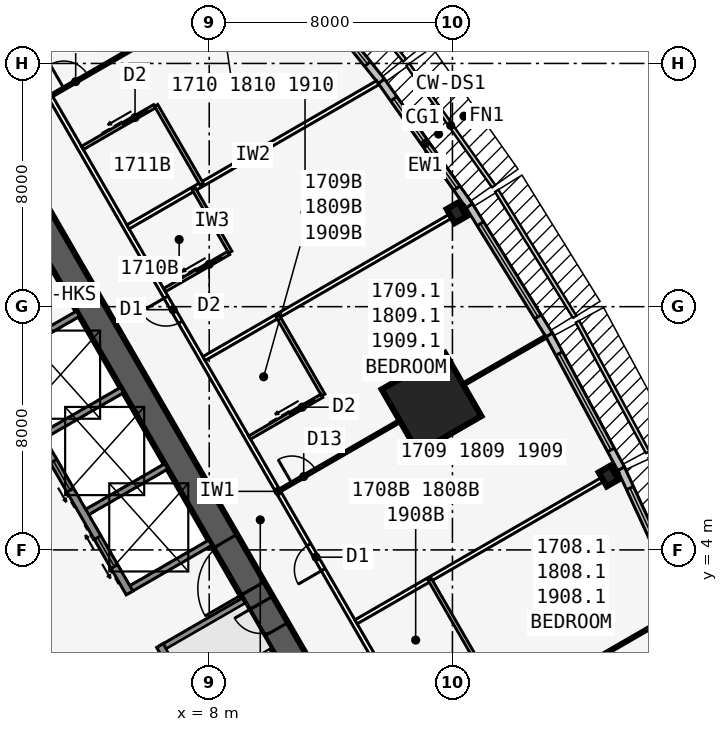
"""IFC4 building model, lengths in metres.
Left out: names, types, materials, properties, quantities, classifications, styles, units other than length and angle.
Written with IfcOpenShell. Run it as: python <this file> out.ifc"""

import sys

from ifc_helpers import new_model, si_unit, direction, frame, frame_2d, origin, origin_2d, place, context, subcontext, project, spatial, rectangle, i_section, extrude, element, fill, save


model = new_model("IFC4")
c1 = context("Model", 3, precision=1e-05, world=origin(), true_north=direction((0.0, 1.0)))
c2 = subcontext(c1, "Body", "Model", "MODEL_VIEW")
j1 = project(units=[si_unit("LENGTHUNIT", "METRE"), si_unit("PLANEANGLEUNIT", "RADIAN")], contexts=[c1])
p1 = place(None, origin())
s1 = spatial("IfcSite", under=j1, at=p1, CompositionType="ELEMENT")
p2 = place(p1, origin())
s2 = spatial("IfcBuilding", under=s1, at=p2, CompositionType="ELEMENT")
p3 = place(p2, frame((0.0, 0.0, 69.3)))
s3 = spatial("IfcBuildingStorey", under=s2, at=p3, CompositionType="ELEMENT", Elevation=69.3)
p4 = place(p3, frame((16.5, -9.526, 0.0), z_axis=(0.0, 0.0, 1.0), x_axis=(-0.499999749417, 0.866025548458, 0.0)))
e1 = element("IfcWall", 1, at=p4, inside=s3, PredefinedType="SHEAR", context=c2, shape_type="SweptSolid", body=[
    extrude(rectangle(XDim=33.0, YDim=0.9, at=frame_2d((16.5, 0.0))), origin(), (0.0, 0.0, 1.0), 3.4),
])
p5 = place(p4, frame((14.15, 0.0, 0.0)))
e2 = element("IfcOpeningElement", 2, at=p5, cuts=e1, PredefinedType="OPENING", context=c2, shape_type="SweptSolid", body=[
    extrude(rectangle(XDim=1.8, YDim=2.13, at=frame_2d((0.9, 1.065))), frame((0.0, 0.46, 0.0), z_axis=(0.0, -1.0, 0.0), x_axis=(1.0, 0.0, 0.0)), (0.0, 0.0, 1.0), 0.92),
])
p6 = place(p4, frame((12.6, 0.0, 0.0)))
e3 = element("IfcOpeningElement", 3, at=p6, cuts=e1, PredefinedType="OPENING", context=c2, shape_type="SweptSolid", body=[
    extrude(rectangle(XDim=1.0, YDim=2.13, at=frame_2d((0.5, 1.065))), frame((0.0, 0.46, 0.0), z_axis=(0.0, -1.0, 0.0), x_axis=(1.0, 0.0, 0.0)), (0.0, 0.0, 1.0), 0.92),
])
p7 = place(p3, frame((10.245, -5.843, 0.0), z_axis=(0.0, 0.0, 1.0), x_axis=(-0.499993009313, 0.866029439822, 0.0)))
e4 = element("IfcWall", 4, at=p7, inside=s3, PredefinedType="SOLIDWALL", context=c2, shape_type="SweptSolid", body=[
    extrude(rectangle(XDim=7.733, YDim=0.25, at=frame_2d((3.866, 0.0))), origin(), (0.0, 0.0, 1.0), 3.235),
])
p8 = place(p3, frame((5.379, 2.586, 0.0), z_axis=(0.0, 0.0, 1.0), x_axis=(-0.500001375892, 0.866024609411, 0.0)))
e5 = element("IfcWall", 5, at=p8, inside=s3, PredefinedType="SOLIDWALL", context=c2, shape_type="SweptSolid", body=[
    extrude(rectangle(XDim=10.633, YDim=0.25, at=frame_2d((5.316, 0.0))), origin(), (0.0, 0.0, 1.0), 3.235),
])
p9 = place(p8, frame((9.164, 0.0, 0.0)))
e6 = element("IfcOpeningElement", 6, at=p9, cuts=e5, PredefinedType="OPENING", context=c2, shape_type="SweptSolid", body=[
    extrude(rectangle(XDim=0.9, YDim=2.13, at=frame_2d((0.45, 1.065))), frame((0.0, 0.135, 0.0), z_axis=(0.0, -1.0, 0.0), x_axis=(1.0, 0.0, 0.0)), (0.0, 0.0, 1.0), 0.27),
])
p10 = place(p8, frame((1.0, 0.0, 0.0)))
e7 = element("IfcOpeningElement", 7, at=p10, cuts=e5, PredefinedType="OPENING", context=c2, shape_type="SweptSolid", body=[
    extrude(rectangle(XDim=1.1, YDim=2.13, at=frame_2d((0.55, 1.065))), frame((0.0, 0.135, 0.0), z_axis=(0.0, -1.0, 0.0), x_axis=(1.0, 0.0, 0.0)), (0.0, 0.0, 1.0), 0.27),
])
p11 = place(p8, frame((3.9, 0.0, 0.0)))
e8 = element("IfcOpeningElement", 8, at=p11, cuts=e5, PredefinedType="OPENING", context=c2, shape_type="SweptSolid", body=[
    extrude(rectangle(XDim=1.1, YDim=2.13, at=frame_2d((0.55, 1.065))), frame((0.0, 0.135, 0.0), z_axis=(0.0, -1.0, 0.0), x_axis=(1.0, 0.0, 0.0)), (0.0, 0.0, 1.0), 0.27),
])
p12 = place(p8, frame((6.8, 0.0, 0.0)))
e9 = element("IfcOpeningElement", 9, at=p12, cuts=e5, PredefinedType="OPENING", context=c2, shape_type="SweptSolid", body=[
    extrude(rectangle(XDim=1.1, YDim=2.13, at=frame_2d((0.55, 1.065))), frame((0.0, 0.135, 0.0), z_axis=(0.0, -1.0, 0.0), x_axis=(1.0, 0.0, 0.0)), (0.0, 0.0, 1.0), 0.27),
])
for number, where, z_axis, x_axis in (
    (10, (6.429, 0.767, 0.0), (0.0, 0.0, 1.0), (0.866, 0.5, 0.0)),
    (11, (5.329, 2.673, 0.0), (0.0, 0.0, 1.0), (0.866, 0.5, 0.0)),
    (12, (3.879, 5.184, 0.0), (0.0, 0.0, 1.0), (0.866, 0.5, 0.0)),
    (13, (2.429, 7.696, 0.0), (0.0, 0.0, 1.0), (0.866, 0.5, 0.0)),
    (14, (0.979, 10.207, 0.0), (0.0, 0.0, 1.0), (0.866, 0.5, 0.0)),
):
    element("IfcWall", number, at=place(p3, frame(where, z_axis=z_axis, x_axis=x_axis)), inside=s3, PredefinedType="SOLIDWALL", context=c2, shape_type="SweptSolid", body=[
        extrude(rectangle(XDim=3.125, YDim=0.2, at=frame_2d((1.562, 0.0))), origin(), (0.0, 0.0, 1.0), 3.235),
    ])
for number, where, z_axis, x_axis in (
    (15, (21.137, 6.43, 0.0), (0.0, 0.0, 1.0), (0.866, 0.5, 0.0)),
    (16, (16.137, 15.09, 0.0), (0.0, 0.0, 1.0), (0.866, 0.5, 0.0)),
):
    element("IfcColumn", number, at=place(p3, frame(where, z_axis=z_axis, x_axis=x_axis)), inside=s3, PredefinedType="COLUMN", context=c2, shape_type="SweptSolid", body=[
        extrude(i_section(OverallWidth=0.442, OverallDepth=0.531, WebThickness=0.066, FlangeThickness=0.106, at=origin_2d()), origin(), (0.0, 0.0, 1.0), 3.4),
    ])
p13 = place(p3, frame((15.312, 8.84, 0.0), z_axis=(0.0, 0.0, 1.0), x_axis=(0.866025403784, 0.5, 0.0)))
e17 = element("IfcColumn", 17, at=p13, inside=s3, PredefinedType="COLUMN", context=c2, shape_type="SweptSolid", body=[
    extrude(rectangle(XDim=2.4, YDim=2.4, at=origin_2d()), origin(), (0.0, 0.0, 1.0), 3.4),
])
p14 = place(p3, frame((23.648, 2.119, 0.0), z_axis=(0.0, 0.0, 1.0), x_axis=(-0.419203100754, 0.907892482796, 0.0)))
e18 = element("IfcWall", 18, at=p14, inside=s3, PredefinedType="STANDARD", context=c2, shape_type="SweptSolid", body=[
    extrude(rectangle(XDim=5.021, YDim=0.25, at=frame_2d((2.51, 0.0))), origin(), (0.0, 0.0, 1.0), 3.235),
])
p15 = place(p14, frame((0.71, 0.0, 0.45)))
e19 = element("IfcOpeningElement", 19, at=p15, cuts=e18, PredefinedType="OPENING", context=c2, shape_type="SweptSolid", body=[
    extrude(rectangle(XDim=3.6, YDim=2.4, at=frame_2d((1.8, 1.2))), frame((0.0, 0.135, 0.0), z_axis=(0.0, -1.0, 0.0), x_axis=(1.0, 0.0, 0.0)), (0.0, 0.0, 1.0), 0.27),
])
p16 = place(p3, frame((21.547, 6.671, 0.0), z_axis=(0.0, 0.0, 1.0), x_axis=(-0.473412820489, 0.880840678782, 0.0)))
e20 = element("IfcWall", 20, at=p16, inside=s3, PredefinedType="STANDARD", context=c2, shape_type="SweptSolid", body=[
    extrude(rectangle(XDim=5.002, YDim=0.25, at=frame_2d((2.501, 0.0))), origin(), (0.0, 0.0, 1.0), 3.235),
])
p17 = place(p16, frame((0.701, 0.0, 0.45)))
e21 = element("IfcOpeningElement", 21, at=p17, cuts=e20, PredefinedType="OPENING", context=c2, shape_type="SweptSolid", body=[
    extrude(rectangle(XDim=3.6, YDim=2.4, at=frame_2d((1.8, 1.2))), frame((0.0, 0.135, 0.0), z_axis=(0.0, -1.0, 0.0), x_axis=(1.0, 0.0, 0.0)), (0.0, 0.0, 1.0), 0.27),
])
p18 = place(p3, frame((19.182, 11.071, 0.0), z_axis=(0.0, 0.0, 1.0), x_axis=(-0.526132807704, 0.850402415717, 0.0)))
e22 = element("IfcWall", 22, at=p18, inside=s3, PredefinedType="STANDARD", context=c2, shape_type="SweptSolid", body=[
    extrude(rectangle(XDim=5.002, YDim=0.25, at=frame_2d((2.501, 0.0))), origin(), (0.0, 0.0, 1.0), 3.235),
])
p19 = place(p18, frame((0.701, 0.0, 0.45)))
e23 = element("IfcOpeningElement", 23, at=p19, cuts=e22, PredefinedType="OPENING", context=c2, shape_type="SweptSolid", body=[
    extrude(rectangle(XDim=3.6, YDim=2.4, at=frame_2d((1.8, 1.2))), frame((0.0, 0.135, 0.0), z_axis=(0.0, -1.0, 0.0), x_axis=(1.0, 0.0, 0.0)), (0.0, 0.0, 1.0), 0.27),
])
p20 = place(p3, frame((16.555, 15.318, 0.0), z_axis=(0.0, 0.0, 1.0), x_axis=(-0.5766431066, 0.81699616132, 0.0)))
e24 = element("IfcWall", 24, at=p20, inside=s3, PredefinedType="STANDARD", context=c2, shape_type="SweptSolid", body=[
    extrude(rectangle(XDim=5.021, YDim=0.25, at=frame_2d((2.51, 0.0))), origin(), (0.0, 0.0, 1.0), 3.235),
])
p21 = place(p20, frame((0.71, 0.0, 0.45)))
e25 = element("IfcOpeningElement", 25, at=p21, cuts=e24, PredefinedType="OPENING", context=c2, shape_type="SweptSolid", body=[
    extrude(rectangle(XDim=3.6, YDim=2.4, at=frame_2d((1.8, 1.2))), frame((0.0, 0.135, 0.0), z_axis=(0.0, -1.0, 0.0), x_axis=(1.0, 0.0, 0.0)), (0.0, 0.0, 1.0), 0.27),
])
p22 = place(p3, frame((13.664, 19.414, 0.0), z_axis=(0.0, 0.0, 1.0), x_axis=(-0.624594965756, 0.780948864364, 0.0)))
e26 = element("IfcWall", 26, at=p22, inside=s3, PredefinedType="STANDARD", context=c2, shape_type="SweptSolid", body=[
    extrude(rectangle(XDim=5.058, YDim=0.25, at=frame_2d((2.529, 0.0))), origin(), (0.0, 0.0, 1.0), 3.235),
])
p23 = place(p22, frame((0.729, 0.0, 0.45)))
e27 = element("IfcOpeningElement", 27, at=p23, cuts=e26, PredefinedType="OPENING", context=c2, shape_type="SweptSolid", body=[
    extrude(rectangle(XDim=3.6, YDim=2.4, at=frame_2d((1.8, 1.2))), frame((0.0, 0.135, 0.0), z_axis=(0.0, -1.0, 0.0), x_axis=(1.0, 0.0, 0.0)), (0.0, 0.0, 1.0), 0.27),
])
p24 = place(p3, frame((20.027, -10.985, 0.0), z_axis=(0.0, 0.0, 1.0), x_axis=(-0.500001677587, 0.866024435227, 0.0)))
e28 = element("IfcWall", 28, at=p24, inside=s3, PredefinedType="PARTITIONING", context=c2, shape_type="SweptSolid", body=[
    extrude(rectangle(XDim=39.054, YDim=0.15, at=frame_2d((19.527, 0.0))), origin(), (0.0, 0.0, 1.0), 3.235),
])
p25 = place(p24, frame((0.352, 0.0, 0.0)))
e29 = element("IfcOpeningElement", 29, at=p25, cuts=e28, PredefinedType="OPENING", context=c2, shape_type="SweptSolid", body=[
    extrude(rectangle(XDim=0.95, YDim=2.13, at=frame_2d((0.475, 1.065))), frame((0.0, 0.085, 0.0), z_axis=(0.0, -1.0, 0.0), x_axis=(1.0, 0.0, 0.0)), (0.0, 0.0, 1.0), 0.17),
])
p26 = place(p24, frame((6.552, 0.0, 0.0)))
e30 = element("IfcOpeningElement", 30, at=p26, cuts=e28, PredefinedType="OPENING", context=c2, shape_type="SweptSolid", body=[
    extrude(rectangle(XDim=0.95, YDim=2.13, at=frame_2d((0.475, 1.065))), frame((0.0, 0.085, 0.0), z_axis=(0.0, -1.0, 0.0), x_axis=(1.0, 0.0, 0.0)), (0.0, 0.0, 1.0), 0.17),
])
p27 = place(p24, frame((16.552, 0.0, 0.0)))
e31 = element("IfcOpeningElement", 31, at=p27, cuts=e28, PredefinedType="OPENING", context=c2, shape_type="SweptSolid", body=[
    extrude(rectangle(XDim=0.95, YDim=2.13, at=frame_2d((0.475, 1.065))), frame((0.0, 0.085, 0.0), z_axis=(0.0, -1.0, 0.0), x_axis=(1.0, 0.0, 0.0)), (0.0, 0.0, 1.0), 0.17),
])
p28 = place(p24, frame((25.952, 0.0, 0.0)))
e32 = element("IfcOpeningElement", 32, at=p28, cuts=e28, PredefinedType="OPENING", context=c2, shape_type="SweptSolid", body=[
    extrude(rectangle(XDim=0.95, YDim=2.13, at=frame_2d((0.475, 1.065))), frame((0.0, 0.085, 0.0), z_axis=(0.0, -1.0, 0.0), x_axis=(1.0, 0.0, 0.0)), (0.0, 0.0, 1.0), 0.17),
])
p29 = place(p24, frame((36.546, 0.0, 0.0)))
e33 = element("IfcOpeningElement", 33, at=p29, cuts=e28, PredefinedType="OPENING", context=c2, shape_type="SweptSolid", body=[
    extrude(rectangle(XDim=0.95, YDim=2.13, at=frame_2d((0.475, 1.065))), frame((0.0, 0.085, 0.0), z_axis=(0.0, -1.0, 0.0), x_axis=(1.0, 0.0, 0.0)), (0.0, 0.0, 1.0), 0.17),
])
p30 = place(p3, frame((15.329, -2.697, 0.0), z_axis=(0.0, 0.0, 1.0), x_axis=(0.866018409083, 0.500012114982, 0.0)))
e34 = element("IfcWall", 34, at=p30, inside=s3, PredefinedType="PARTITIONING", context=c2, shape_type="SweptSolid", body=[
    extrude(rectangle(XDim=9.485, YDim=0.1, at=frame_2d((4.742, 0.0))), origin(), (0.0, 0.0, 1.0), 2.389),
])
p31 = place(p30, frame((0.45, 0.0, 0.0)))
e35 = element("IfcOpeningElement", 35, at=p31, cuts=e34, PredefinedType="OPENING", context=c2, shape_type="SweptSolid", body=[
    extrude(rectangle(XDim=0.9, YDim=2.13, at=frame_2d((0.45, 1.065))), frame((0.0, 0.06, 0.0), z_axis=(0.0, -1.0, 0.0), x_axis=(1.0, 0.0, 0.0)), (0.0, 0.0, 1.0), 0.12),
])
p32 = place(p3, frame((12.829, 1.633, 0.0), z_axis=(0.0, 0.0, 1.0), x_axis=(0.866026934769, 0.499997348248, 0.0)))
e36 = element("IfcWall", 36, at=p32, inside=s3, PredefinedType="PARTITIONING", context=c2, shape_type="SweptSolid", body=[
    extrude(rectangle(XDim=9.943, YDim=0.15, at=frame_2d((4.971, 0.0))), origin(), (0.0, 0.0, 1.0), 2.389),
])
p33 = place(p3, frame((10.329, 5.963, 0.0), z_axis=(0.0, 0.0, 1.0), x_axis=(0.866021688545, 0.500006434927, 0.0)))
e37 = element("IfcWall", 37, at=p33, inside=s3, PredefinedType="PARTITIONING", context=c2, shape_type="SweptSolid", body=[
    extrude(rectangle(XDim=10.096, YDim=0.1, at=frame_2d((5.048, 0.0))), origin(), (0.0, 0.0, 1.0), 2.389),
])
p34 = place(p33, frame((0.45, 0.0, 0.0)))
e38 = element("IfcOpeningElement", 38, at=p34, cuts=e37, PredefinedType="OPENING", context=c2, shape_type="SweptSolid", body=[
    extrude(rectangle(XDim=0.9, YDim=2.13, at=frame_2d((0.45, 1.065))), frame((0.0, 0.06, 0.0), z_axis=(0.0, -1.0, 0.0), x_axis=(1.0, 0.0, 0.0)), (0.0, 0.0, 1.0), 0.12),
])
p35 = place(p3, frame((7.829, 10.293, 0.0), z_axis=(0.0, 0.0, 1.0), x_axis=(0.866016302457, 0.50001576363, 0.0)))
e39 = element("IfcWall", 39, at=p35, inside=s3, PredefinedType="PARTITIONING", context=c2, shape_type="SweptSolid", body=[
    extrude(rectangle(XDim=9.943, YDim=0.15, at=frame_2d((4.972, 0.0))), origin(), (0.0, 0.0, 1.0), 2.389),
])
p36 = place(p3, frame((5.329, 14.623, 0.0), z_axis=(0.0, 0.0, 1.0), x_axis=(0.866018409083, 0.500012114982, 0.0)))
e40 = element("IfcWall", 40, at=p36, inside=s3, PredefinedType="PARTITIONING", context=c2, shape_type="SweptSolid", body=[
    extrude(rectangle(XDim=9.485, YDim=0.15, at=frame_2d((4.742, 0.0))), origin(), (0.0, 0.0, 1.0), 2.389),
])
p37 = place(p3, frame((2.829, 18.954, 0.0), z_axis=(0.0, 0.0, 1.0), x_axis=(0.866020536561, 0.500008430184, 0.0)))
e41 = element("IfcWall", 41, at=p37, inside=s3, PredefinedType="PARTITIONING", context=c2, shape_type="SweptSolid", body=[
    extrude(rectangle(XDim=8.72, YDim=0.1, at=frame_2d((4.36, 0.0))), origin(), (0.0, 0.0, 1.0), 2.389),
])
p38 = place(p37, frame((0.45, 0.0, 0.0)))
e42 = element("IfcOpeningElement", 42, at=p38, cuts=e41, PredefinedType="OPENING", context=c2, shape_type="SweptSolid", body=[
    extrude(rectangle(XDim=0.9, YDim=2.13, at=frame_2d((0.45, 1.065))), frame((0.0, 0.06, 0.0), z_axis=(0.0, -1.0, 0.0), x_axis=(1.0, 0.0, 0.0)), (0.0, 0.0, 1.0), 0.12),
])
for number, where, z_axis, x_axis in (
    (43, (16.753, 0.435, 0.0), (0.0, 0.0, 1.0), (-0.5, 0.866, 0.0)),
    (44, (11.753, 9.095, 0.0), (0.0, 0.0, 1.0), (-0.5, 0.866, 0.0)),
):
    element("IfcWall", number, at=place(p3, frame(where, z_axis=z_axis, x_axis=x_axis)), inside=s3, PredefinedType="PLUMBINGWALL", context=c2, shape_type="SweptSolid", body=[
        extrude(rectangle(XDim=3.0, YDim=0.12, at=frame_2d((1.5, 0.0))), origin(), (0.0, 0.0, 1.0), 3.235),
    ])
p39 = place(p3, frame((9.329, 7.695, 0.0), z_axis=(0.0, 0.0, 1.0), x_axis=(0.866035715982, 0.499982138324, 0.0)))
e45 = element("IfcWall", 45, at=p39, inside=s3, PredefinedType="PLUMBINGWALL", context=c2, shape_type="SweptSolid", body=[
    extrude(rectangle(XDim=2.74, YDim=0.12, at=frame_2d((1.37, 0.0))), origin(), (0.0, 0.0, 1.0), 3.235),
])
p40 = place(p39, frame((1.55, 0.0, 0.0)))
e46 = element("IfcOpeningElement", 46, at=p40, cuts=e45, PredefinedType="OPENING", context=c2, shape_type="SweptSolid", body=[
    extrude(rectangle(XDim=0.9, YDim=2.13, at=frame_2d((0.45, 1.065))), frame((0.0, 0.07, 0.0), z_axis=(0.0, -1.0, 0.0), x_axis=(1.0, 0.0, 0.0)), (0.0, 0.0, 1.0), 0.14),
])
p41 = place(p3, frame((8.694, 13.795, 0.0), z_axis=(0.0, 0.0, 1.0), x_axis=(-0.500077600433, 0.865980596518, 0.0)))
e47 = element("IfcWall", 47, at=p41, inside=s3, PredefinedType="PLUMBINGWALL", context=c2, shape_type="SweptSolid", body=[
    extrude(rectangle(XDim=2.4, YDim=0.12, at=frame_2d((1.2, 0.0))), origin(), (0.0, 0.0, 1.0), 3.235),
])
p42 = place(p3, frame((6.529, 12.545, 0.0), z_axis=(0.0, 0.0, 1.0), x_axis=(0.866023955769, 0.500002508028, 0.0)))
e48 = element("IfcWall", 48, at=p42, inside=s3, PredefinedType="PLUMBINGWALL", context=c2, shape_type="SweptSolid", body=[
    extrude(rectangle(XDim=2.44, YDim=0.12, at=frame_2d((1.22, 0.0))), origin(), (0.0, 0.0, 1.0), 3.235),
])
p43 = place(p42, frame((1.25, 0.0, 0.0)))
e49 = element("IfcOpeningElement", 49, at=p43, cuts=e48, PredefinedType="OPENING", context=c2, shape_type="SweptSolid", body=[
    extrude(rectangle(XDim=0.9, YDim=2.13, at=frame_2d((0.45, 1.065))), frame((0.0, 0.07, 0.0), z_axis=(0.0, -1.0, 0.0), x_axis=(1.0, 0.0, 0.0)), (0.0, 0.0, 1.0), 0.14),
])
p44 = place(p3, frame((7.753, 16.023, 0.0), z_axis=(0.0, 0.0, 1.0), x_axis=(-0.499990139034, 0.866031096941, 0.0)))
e50 = element("IfcWall", 50, at=p44, inside=s3, PredefinedType="PLUMBINGWALL", context=c2, shape_type="SweptSolid", body=[
    extrude(rectangle(XDim=3.0, YDim=0.12, at=frame_2d((1.5, 0.0))), origin(), (0.0, 0.0, 1.0), 3.235),
])
p45 = place(p3, frame((3.829, 17.221, 0.0), z_axis=(0.0, 0.0, 1.0), x_axis=(0.865997131366, 0.500048966069, 0.0)))
e51 = element("IfcWall", 51, at=p45, inside=s3, PredefinedType="PLUMBINGWALL", context=c2, shape_type="SweptSolid", body=[
    extrude(rectangle(XDim=2.74, YDim=0.12, at=frame_2d((1.37, 0.0))), origin(), (0.0, 0.0, 1.0), 3.235),
])
p46 = place(p45, frame((1.55, 0.0, 0.0)))
e52 = element("IfcOpeningElement", 52, at=p46, cuts=e51, PredefinedType="OPENING", context=c2, shape_type="SweptSolid", body=[
    extrude(rectangle(XDim=0.9, YDim=2.13, at=frame_2d((0.45, 1.065))), frame((0.0, 0.07, 0.0), z_axis=(0.0, -1.0, 0.0), x_axis=(1.0, 0.0, 0.0)), (0.0, 0.0, 1.0), 0.14),
])
p47 = place(p15, origin())
e53 = element("IfcWindow", 53, at=p47, inside=s3, PartitioningType="SINGLE_PANEL", PredefinedType="WINDOW", context=c2, shape_type="SweptSolid", body=[
    extrude(rectangle(XDim=3.6, YDim=2.4, at=frame_2d((1.8, 1.2))), frame((0.0, 0.03, 0.0), z_axis=(0.0, -1.0, 0.0), x_axis=(1.0, 0.0, 0.0)), (0.0, 0.0, 1.0), 0.06),
])
fill(e19, e53)
p48 = place(p17, origin())
e54 = element("IfcWindow", 54, at=p48, inside=s3, PartitioningType="SINGLE_PANEL", PredefinedType="WINDOW", context=c2, shape_type="SweptSolid", body=[
    extrude(rectangle(XDim=3.6, YDim=2.4, at=frame_2d((1.8, 1.2))), frame((0.0, 0.03, 0.0), z_axis=(0.0, -1.0, 0.0), x_axis=(1.0, 0.0, 0.0)), (0.0, 0.0, 1.0), 0.06),
])
fill(e21, e54)
p49 = place(p19, origin())
e55 = element("IfcWindow", 55, at=p49, inside=s3, PartitioningType="SINGLE_PANEL", PredefinedType="WINDOW", context=c2, shape_type="SweptSolid", body=[
    extrude(rectangle(XDim=3.6, YDim=2.4, at=frame_2d((1.8, 1.2))), frame((0.0, 0.03, 0.0), z_axis=(0.0, -1.0, 0.0), x_axis=(1.0, 0.0, 0.0)), (0.0, 0.0, 1.0), 0.06),
])
fill(e23, e55)
p50 = place(p21, origin())
e56 = element("IfcWindow", 56, at=p50, inside=s3, PartitioningType="SINGLE_PANEL", PredefinedType="WINDOW", context=c2, shape_type="SweptSolid", body=[
    extrude(rectangle(XDim=3.6, YDim=2.4, at=frame_2d((1.8, 1.2))), frame((0.0, 0.03, 0.0), z_axis=(0.0, -1.0, 0.0), x_axis=(1.0, 0.0, 0.0)), (0.0, 0.0, 1.0), 0.06),
])
fill(e25, e56)
p51 = place(p23, origin())
e57 = element("IfcWindow", 57, at=p51, inside=s3, PartitioningType="SINGLE_PANEL", PredefinedType="WINDOW", context=c2, shape_type="SweptSolid", body=[
    extrude(rectangle(XDim=3.6, YDim=2.4, at=frame_2d((1.8, 1.2))), frame((0.0, 0.03, 0.0), z_axis=(0.0, -1.0, 0.0), x_axis=(1.0, 0.0, 0.0)), (0.0, 0.0, 1.0), 0.06),
])
fill(e27, e57)
p52 = place(p34, origin())
e58 = element("IfcDoor", 58, at=p52, inside=s3, OperationType="SINGLE_SWING_LEFT", PredefinedType="DOOR", context=c2, shape_type="SweptSolid", body=[
    extrude(rectangle(XDim=0.9, YDim=2.13, at=frame_2d((0.45, 1.065))), frame((0.0, 0.025, 0.0), z_axis=(0.0, -1.0, 0.0), x_axis=(1.0, 0.0, 0.0)), (0.0, 0.0, 1.0), 0.05),
])
fill(e38, e58)
p53 = place(p38, origin())
e59 = element("IfcDoor", 59, at=p53, inside=s3, OperationType="SINGLE_SWING_LEFT", PredefinedType="DOOR", context=c2, shape_type="SweptSolid", body=[
    extrude(rectangle(XDim=0.9, YDim=2.13, at=frame_2d((0.45, 1.065))), frame((0.0, 0.025, 0.0), z_axis=(0.0, -1.0, 0.0), x_axis=(1.0, 0.0, 0.0)), (0.0, 0.0, 1.0), 0.05),
])
fill(e42, e59)
p54 = place(p27, origin())
e60 = element("IfcDoor", 60, at=p54, inside=s3, OperationType="SINGLE_SWING_LEFT", PredefinedType="DOOR", context=c2, shape_type="SweptSolid", body=[
    extrude(rectangle(XDim=0.95, YDim=2.13, at=frame_2d((0.475, 1.065))), frame((0.0, 0.025, 0.0), z_axis=(0.0, -1.0, 0.0), x_axis=(1.0, 0.0, 0.0)), (0.0, 0.0, 1.0), 0.05),
])
fill(e31, e60)
p55 = place(p40, origin())
e61 = element("IfcDoor", 61, at=p55, inside=s3, OperationType="SLIDING_TO_LEFT", PredefinedType="DOOR", context=c2, shape_type="SweptSolid", body=[
    extrude(rectangle(XDim=0.9, YDim=2.13, at=frame_2d((0.45, 1.065))), frame((0.0, 0.025, 0.0), z_axis=(0.0, -1.0, 0.0), x_axis=(1.0, 0.0, 0.0)), (0.0, 0.0, 1.0), 0.05),
])
fill(e46, e61)
p56 = place(p43, origin())
e62 = element("IfcDoor", 62, at=p56, inside=s3, OperationType="SLIDING_TO_LEFT", PredefinedType="DOOR", context=c2, shape_type="SweptSolid", body=[
    extrude(rectangle(XDim=0.9, YDim=2.13, at=frame_2d((0.45, 1.065))), frame((0.0, 0.025, 0.0), z_axis=(0.0, -1.0, 0.0), x_axis=(1.0, 0.0, 0.0)), (0.0, 0.0, 1.0), 0.05),
])
fill(e49, e62)
p57 = place(p28, origin())
e63 = element("IfcDoor", 63, at=p57, inside=s3, OperationType="SINGLE_SWING_RIGHT", PredefinedType="DOOR", context=c2, shape_type="SweptSolid", body=[
    extrude(rectangle(XDim=0.95, YDim=2.13, at=frame_2d((0.475, 1.065))), frame((0.0, 0.025, 0.0), z_axis=(0.0, -1.0, 0.0), x_axis=(1.0, 0.0, 0.0)), (0.0, 0.0, 1.0), 0.05),
])
fill(e32, e63)
p58 = place(p46, origin())
e64 = element("IfcDoor", 64, at=p58, inside=s3, OperationType="SLIDING_TO_LEFT", PredefinedType="DOOR", context=c2, shape_type="SweptSolid", body=[
    extrude(rectangle(XDim=0.9, YDim=2.13, at=frame_2d((0.45, 1.065))), frame((0.0, 0.025, 0.0), z_axis=(0.0, -1.0, 0.0), x_axis=(1.0, 0.0, 0.0)), (0.0, 0.0, 1.0), 0.05),
])
fill(e52, e64)
p59 = place(p5, origin())
e65 = element("IfcDoor", 65, at=p59, inside=s3, OperationType="DOUBLE_DOOR_SINGLE_SWING", PredefinedType="DOOR", context=c2, shape_type="SweptSolid", body=[
    extrude(rectangle(XDim=1.8, YDim=2.13, at=frame_2d((0.9, 1.065))), frame((0.0, 0.025, 0.0), z_axis=(0.0, -1.0, 0.0), x_axis=(1.0, 0.0, 0.0)), (0.0, 0.0, 1.0), 0.05),
])
fill(e2, e65)
p60 = place(p6, origin())
e66 = element("IfcDoor", 66, at=p60, inside=s3, OperationType="SINGLE_SWING_RIGHT", PredefinedType="DOOR", context=c2, shape_type="SweptSolid", body=[
    extrude(rectangle(XDim=1.0, YDim=2.13, at=frame_2d((0.5, 1.065))), frame((0.0, 0.025, 0.0), z_axis=(0.0, -1.0, 0.0), x_axis=(1.0, 0.0, 0.0)), (0.0, 0.0, 1.0), 0.05),
])
fill(e3, e66)
p61 = place(p10, origin())
e67 = element("IfcDoor", 67, at=p61, inside=s3, OperationType="DOUBLE_DOOR_SLIDING", PredefinedType="USERDEFINED", context=c2, shape_type="SweptSolid", body=[
    extrude(rectangle(XDim=1.1, YDim=2.13, at=frame_2d((0.55, 1.065))), frame((0.0, 0.025, 0.0), z_axis=(0.0, -1.0, 0.0), x_axis=(1.0, 0.0, 0.0)), (0.0, 0.0, 1.0), 0.05),
])
fill(e7, e67)
p62 = place(p11, origin())
e68 = element("IfcDoor", 68, at=p62, inside=s3, OperationType="DOUBLE_DOOR_SLIDING", PredefinedType="USERDEFINED", context=c2, shape_type="SweptSolid", body=[
    extrude(rectangle(XDim=1.1, YDim=2.13, at=frame_2d((0.55, 1.065))), frame((0.0, 0.025, 0.0), z_axis=(0.0, -1.0, 0.0), x_axis=(1.0, 0.0, 0.0)), (0.0, 0.0, 1.0), 0.05),
])
fill(e8, e68)
save(model, sys.argv[1])
